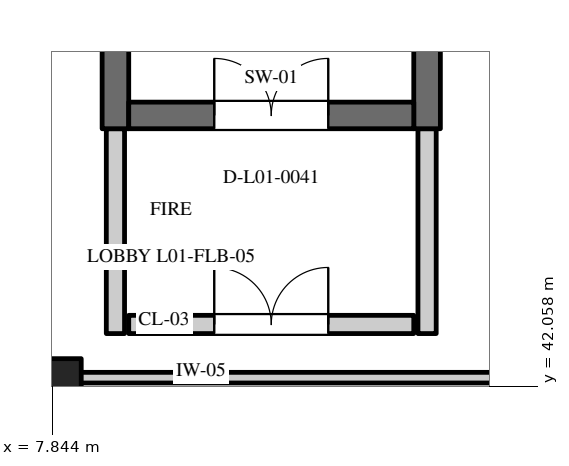
"""IFC4 building model, lengths in metres.
Left out: names, types, materials, properties, quantities, classifications, styles, units other than length and angle.
Written with IfcOpenShell. Run it as: python <this file> out.ifc"""

import sys

from ifc_helpers import new_model, si_unit, direction, frame, frame_2d, origin, origin_2d, place, context, subcontext, project, spatial, rectangle, extrude, element, fill, save


model = new_model("IFC4")
c1 = context("Model", 3, precision=1e-05, world=origin(), true_north=direction((0.0, 1.0)))
c2 = subcontext(c1, "Body", "Model", "MODEL_VIEW")
j1 = project(units=[si_unit("LENGTHUNIT", "METRE"), si_unit("PLANEANGLEUNIT", "RADIAN")], contexts=[c1])
p1 = place(None, origin())
s1 = spatial("IfcSite", under=j1, at=p1, CompositionType="ELEMENT")
p2 = place(p1, origin())
s2 = spatial("IfcBuilding", under=s1, at=p2, CompositionType="ELEMENT")
p3 = place(p2, frame((0.0, 0.0, 4.8)))
s3 = spatial("IfcBuildingStorey", under=s2, at=p3, CompositionType="ELEMENT", Elevation=4.8)
p4 = place(p3, frame((7.8, 42.0, 0.0), z_axis=(0.0, 0.0, 1.0), x_axis=(1.0, 0.0, 0.0)))
e1 = element("IfcColumn", 1, at=p4, inside=s3, PredefinedType="COLUMN", context=c2, shape_type="SweptSolid", body=[
    extrude(rectangle(XDim=0.85, YDim=0.85, at=origin_2d()), origin(), (0.0, 0.0, 1.0), 4.8),
])
for number, where, z_axis, x_axis in (
    (2, (8.675, 45.45, 0.0), (0.0, 0.0, 1.0), (0.0, 1.0, 0.0)),
    (3, (12.775, 45.45, 0.0), (0.0, 0.0, 1.0), (0.0, 1.0, 0.0)),
):
    element("IfcWall", number, at=place(p3, frame(where, z_axis=z_axis, x_axis=x_axis)), inside=s3, PredefinedType="SHEAR", context=c2, shape_type="SweptSolid", body=[
        extrude(rectangle(XDim=10.5, YDim=0.35, at=frame_2d((5.25, 0.0))), origin(), (0.0, 0.0, 1.0), 4.45),
    ])
p5 = place(p3, frame((8.85, 45.625, 0.0), z_axis=(0.0, 0.0, 1.0), x_axis=(1.0, 0.0, 0.0)))
e4 = element("IfcWall", 4, at=p5, inside=s3, PredefinedType="SHEAR", context=c2, shape_type="SweptSolid", body=[
    extrude(rectangle(XDim=3.75, YDim=0.35, at=frame_2d((1.875, 0.0))), origin(), (0.0, 0.0, 1.0), 4.45),
])
p6 = place(p5, frame((1.125, 0.0, 0.0)))
e5 = element("IfcOpeningElement", 5, at=p6, cuts=e4, PredefinedType="OPENING", context=c2, shape_type="SweptSolid", body=[
    extrude(rectangle(XDim=1.5, YDim=2.2, at=frame_2d((0.75, 1.1))), frame((0.0, 0.187, 0.0), z_axis=(0.0, -1.0, 0.0), x_axis=(1.0, 0.0, 0.0)), (0.0, 0.0, 1.0), 0.374),
])
for number, where, z_axis, x_axis in (
    (6, (8.675, 42.755, 0.0), (0.0, 0.0, 1.0), (0.0, 1.0, 0.0)),
    (7, (12.775, 42.755, 0.0), (0.0, 0.0, 1.0), (0.0, 1.0, 0.0)),
):
    element("IfcWall", number, at=place(p3, frame(where, z_axis=z_axis, x_axis=x_axis)), inside=s3, PredefinedType="STANDARD", context=c2, shape_type="SweptSolid", body=[
        extrude(rectangle(XDim=2.695, YDim=0.24, at=frame_2d((1.348, 0.0))), origin(), (0.0, 0.0, 1.0), 4.45),
    ])
p7 = place(p3, frame((8.85, 42.875, 0.0), z_axis=(0.0, 0.0, 1.0), x_axis=(1.0, 0.0, 0.0)))
e8 = element("IfcWall", 8, at=p7, inside=s3, PredefinedType="STANDARD", context=c2, shape_type="SweptSolid", body=[
    extrude(rectangle(XDim=3.75, YDim=0.24, at=frame_2d((1.875, 0.0))), origin(), (0.0, 0.0, 1.0), 4.45),
])
p8 = place(p7, frame((1.125, 0.0, 0.0)))
e9 = element("IfcOpeningElement", 9, at=p8, cuts=e8, PredefinedType="OPENING", context=c2, shape_type="SweptSolid", body=[
    extrude(rectangle(XDim=1.5, YDim=2.2, at=frame_2d((0.75, 1.1))), frame((0.0, 0.132, 0.0), z_axis=(0.0, -1.0, 0.0), x_axis=(1.0, 0.0, 0.0)), (0.0, 0.0, 1.0), 0.264),
])
p9 = place(p3, frame((0.085, 42.175, 0.0), z_axis=(0.0, 0.0, 1.0), x_axis=(1.0, 0.0, 0.0)))
e10 = element("IfcWall", 10, at=p9, inside=s3, PredefinedType="PARTITIONING", context=c2, shape_type="SweptSolid", body=[
    extrude(rectangle(XDim=19.43, YDim=0.14, at=frame_2d((9.715, 0.0))), origin(), (0.0, 0.0, 1.0), 4.43),
])
p10 = place(p9, frame((2.33, 0.0, 0.0)))
e11 = element("IfcOpeningElement", 11, at=p10, cuts=e10, PredefinedType="OPENING", context=c2, shape_type="SweptSolid", body=[
    extrude(rectangle(XDim=1.6, YDim=2.25, at=frame_2d((0.8, 1.125))), frame((0.0, 0.082, 0.0), z_axis=(0.0, -1.0, 0.0), x_axis=(1.0, 0.0, 0.0)), (0.0, 0.0, 1.0), 0.164),
])
p11 = place(p6, origin())
e12 = element("IfcDoor", 12, at=p11, inside=s3, OperationType="DOUBLE_DOOR_SINGLE_SWING", PredefinedType="DOOR", context=c2, shape_type="SweptSolid", body=[
    extrude(rectangle(XDim=1.5, YDim=2.2, at=frame_2d((0.75, 1.1))), frame((0.0, 0.025, 0.0), z_axis=(0.0, -1.0, 0.0), x_axis=(1.0, 0.0, 0.0)), (0.0, 0.0, 1.0), 0.05),
])
fill(e5, e12)
p12 = place(p8, origin())
e13 = element("IfcDoor", 13, at=p12, inside=s3, OperationType="DOUBLE_DOOR_SINGLE_SWING", PredefinedType="DOOR", context=c2, shape_type="SweptSolid", body=[
    extrude(rectangle(XDim=1.5, YDim=2.2, at=frame_2d((0.75, 1.1))), frame((0.0, 0.025, 0.0), z_axis=(0.0, -1.0, 0.0), x_axis=(1.0, 0.0, 0.0)), (0.0, 0.0, 1.0), 0.05),
])
fill(e9, e13)
save(model, sys.argv[1])
